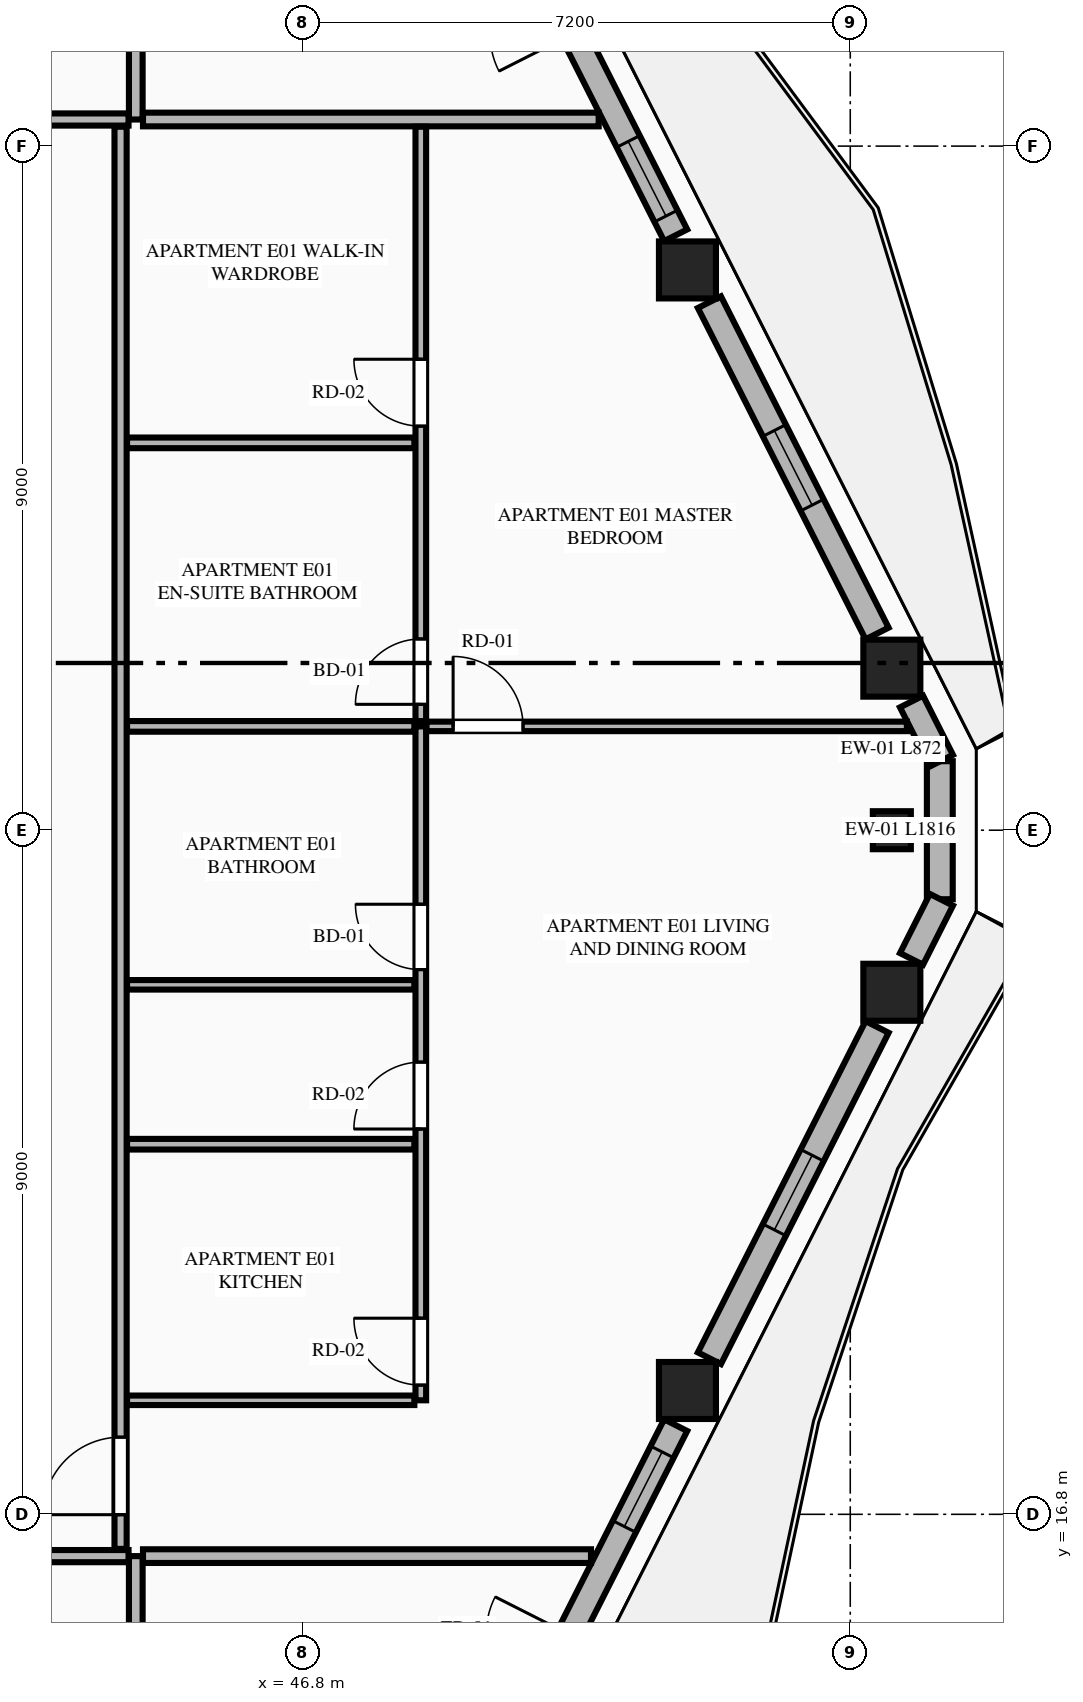
"""IFC4 building model, lengths in metres.
Left out: names, types, materials, properties, quantities, classifications, styles, units other than length and angle.
Written with IfcOpenShell. Run it as: python <this file> out.ifc"""

import sys

from ifc_helpers import new_model, si_unit, direction, frame, frame_2d, origin, origin_2d, place, context, subcontext, project, spatial, rectangle, extrude, element, fill, save


model = new_model("IFC4")
c1 = context("Model", 3, precision=1e-05, world=origin(), true_north=direction((0.0, 1.0)))
c2 = subcontext(c1, "Body", "Model", "MODEL_VIEW")
j1 = project(units=[si_unit("LENGTHUNIT", "METRE"), si_unit("PLANEANGLEUNIT", "RADIAN")], contexts=[c1])
p1 = place(None, origin())
s1 = spatial("IfcSite", under=j1, at=p1, CompositionType="ELEMENT")
p2 = place(p1, origin())
s2 = spatial("IfcBuilding", under=s1, at=p2, CompositionType="ELEMENT")
p3 = place(p2, frame((0.0, 0.0, 210.95)))
s3 = spatial("IfcBuildingStorey", under=s2, at=p3, CompositionType="ELEMENT", Elevation=210.95)
for number, where, z_axis, x_axis in (
    (1, (51.858, 18.429, 0.0), (0.0, 0.0, 1.0), (1.0, 0.0, 0.0)),
    (2, (54.547, 23.668, 0.0), (0.0, 0.0, 1.0), (1.0, 0.0, 0.0)),
    (3, (54.547, 27.932, 0.0), (0.0, 0.0, 1.0), (1.0, 0.0, 0.0)),
    (4, (51.858, 33.171, 0.0), (0.0, 0.0, 1.0), (1.0, 0.0, 0.0)),
):
    element("IfcColumn", number, at=place(p3, frame(where, z_axis=z_axis, x_axis=x_axis)), inside=s3, PredefinedType="COLUMN", context=c2, shape_type="SweptSolid", body=[
        extrude(rectangle(XDim=0.75, YDim=0.75, at=origin_2d()), origin(), (0.0, 0.0, 1.0), 3.55),
    ])
p4 = place(p3, frame((54.547, 25.8, 0.0), z_axis=(0.0, 0.0, 1.0), x_axis=(0.0, 1.0, 0.0)))
e5 = element("IfcColumn", 5, at=p4, inside=s3, PredefinedType="PILASTER", context=c2, shape_type="SweptSolid", body=[
    extrude(rectangle(XDim=0.5, YDim=0.35, at=origin_2d()), origin(), (0.0, 0.0, 1.0), 3.55),
])
p5 = place(p3, frame((55.178, 24.892, 0.0), z_axis=(0.0, 0.0, 1.0), x_axis=(0.0, 1.0, 0.0)))
e6 = element("IfcWall", 6, at=p5, inside=s3, PredefinedType="STANDARD", context=c2, shape_type="SweptSolid", body=[
    extrude(rectangle(XDim=1.816, YDim=0.34, at=frame_2d((0.908, 0.0))), origin(), (0.0, 0.0, 1.0), 3.35),
])
p6 = place(p3, frame((49.403, 13.427, 0.0), z_axis=(0.0, 0.0, 1.0), x_axis=(0.451425765525, 0.892308678777, 0.0)))
e7 = element("IfcWall", 7, at=p6, inside=s3, PredefinedType="STANDARD", context=c2, shape_type="SweptSolid", body=[
    extrude(rectangle(XDim=5.094, YDim=0.34, at=frame_2d((2.547, 0.0))), origin(), (0.0, 0.0, 1.0), 2.883),
])
p7 = place(p6, frame((0.907, 0.0, 0.0)))
e8 = element("IfcOpeningElement", 8, at=p7, cuts=e7, PredefinedType="OPENING", context=c2, shape_type="SweptSolid", body=[
    extrude(rectangle(XDim=1.1, YDim=2.25, at=frame_2d((0.55, 1.125))), frame((0.0, 0.18, 0.0), z_axis=(0.0, -1.0, 0.0), x_axis=(1.0, 0.0, 0.0)), (0.0, 0.0, 1.0), 0.36),
])
p8 = place(p6, frame((3.6, 0.0, 0.75)))
e9 = element("IfcOpeningElement", 9, at=p8, cuts=e7, PredefinedType="OPENING", context=c2, shape_type="SweptSolid", body=[
    extrude(rectangle(XDim=1.1, YDim=1.983, at=frame_2d((0.55, 0.991))), frame((0.0, 0.18, 0.0), z_axis=(0.0, -1.0, 0.0), x_axis=(1.0, 0.0, 0.0)), (0.0, 0.0, 1.0), 0.36),
])
p9 = place(p3, frame((52.147, 18.853, 0.0), z_axis=(0.0, 0.0, 1.0), x_axis=(0.451566029745, 0.892237704191, 0.0)))
e10 = element("IfcWall", 10, at=p9, inside=s3, PredefinedType="STANDARD", context=c2, shape_type="SweptSolid", body=[
    extrude(rectangle(XDim=4.885, YDim=0.34, at=frame_2d((2.443, 0.0))), origin(), (0.0, 0.0, 1.0), 2.883),
])
p10 = place(p9, frame((1.893, 0.0, 0.75)))
e11 = element("IfcOpeningElement", 11, at=p10, cuts=e10, PredefinedType="OPENING", context=c2, shape_type="SweptSolid", body=[
    extrude(rectangle(XDim=1.1, YDim=1.983, at=frame_2d((0.55, 0.991))), frame((0.0, 0.18, 0.0), z_axis=(0.0, -1.0, 0.0), x_axis=(1.0, 0.0, 0.0)), (0.0, 0.0, 1.0), 0.36),
])
p11 = place(p3, frame((54.806, 24.107, 0.0), z_axis=(0.0, 0.0, 1.0), x_axis=(0.450906649871, 0.892571113751, 0.0)))
e12 = element("IfcWall", 12, at=p11, inside=s3, PredefinedType="STANDARD", context=c2, shape_type="SweptSolid", body=[
    extrude(rectangle(XDim=0.872, YDim=0.34, at=frame_2d((0.436, 0.0))), origin(), (0.0, 0.0, 1.0), 3.35),
])
p12 = place(p3, frame((55.199, 26.715, 0.0), z_axis=(0.0, 0.0, 1.0), x_axis=(-0.451019391667, 0.892514150218, 0.0)))
e13 = element("IfcWall", 13, at=p12, inside=s3, PredefinedType="STANDARD", context=c2, shape_type="SweptSolid", body=[
    extrude(rectangle(XDim=0.872, YDim=0.34, at=frame_2d((0.436, 0.0))), origin(), (0.0, 0.0, 1.0), 3.35),
])
p13 = place(p3, frame((54.353, 28.388, 0.0), z_axis=(0.0, 0.0, 1.0), x_axis=(-0.451545895749, 0.892247893824, 0.0)))
e14 = element("IfcWall", 14, at=p13, inside=s3, PredefinedType="STANDARD", context=c2, shape_type="SweptSolid", body=[
    extrude(rectangle(XDim=4.885, YDim=0.34, at=frame_2d((2.443, 0.0))), origin(), (0.0, 0.0, 1.0), 2.883),
])
p14 = place(p13, frame((1.893, 0.0, 0.75)))
e15 = element("IfcOpeningElement", 15, at=p14, cuts=e14, PredefinedType="OPENING", context=c2, shape_type="SweptSolid", body=[
    extrude(rectangle(XDim=1.1, YDim=1.983, at=frame_2d((0.55, 0.991))), frame((0.0, 0.18, 0.0), z_axis=(0.0, -1.0, 0.0), x_axis=(1.0, 0.0, 0.0)), (0.0, 0.0, 1.0), 0.36),
])
p15 = place(p3, frame((51.703, 33.627, 0.0), z_axis=(0.0, 0.0, 1.0), x_axis=(-0.451406462707, 0.892318443957, 0.0)))
e16 = element("IfcWall", 16, at=p15, inside=s3, PredefinedType="STANDARD", context=c2, shape_type="SweptSolid", body=[
    extrude(rectangle(XDim=5.095, YDim=0.34, at=frame_2d((2.547, 0.0))), origin(), (0.0, 0.0, 1.0), 2.883),
])
p16 = place(p15, frame((2.976, 0.0, 0.0)))
e17 = element("IfcOpeningElement", 17, at=p16, cuts=e16, PredefinedType="OPENING", context=c2, shape_type="SweptSolid", body=[
    extrude(rectangle(XDim=1.1, YDim=2.25, at=frame_2d((0.55, 1.125))), frame((0.0, 0.18, 0.0), z_axis=(0.0, -1.0, 0.0), x_axis=(1.0, 0.0, 0.0)), (0.0, 0.0, 1.0), 0.36),
])
p17 = place(p15, frame((0.283, 0.0, 0.75)))
e18 = element("IfcOpeningElement", 18, at=p17, cuts=e16, PredefinedType="OPENING", context=c2, shape_type="SweptSolid", body=[
    extrude(rectangle(XDim=1.1, YDim=1.983, at=frame_2d((0.55, 0.991))), frame((0.0, 0.18, 0.0), z_axis=(0.0, -1.0, 0.0), x_axis=(1.0, 0.0, 0.0)), (0.0, 0.0, 1.0), 0.36),
])
p18 = place(p3, frame((44.6, 5.968, 0.0), z_axis=(0.0, 0.0, 1.0), x_axis=(0.0, 1.0, 0.0)))
e19 = element("IfcWall", 19, at=p18, inside=s3, PredefinedType="PARTITIONING", context=c2, shape_type="SweptSolid", body=[
    extrude(rectangle(XDim=10.282, YDim=0.18, at=frame_2d((5.141, 0.0))), origin(), (0.0, 0.0, 1.0), 3.35),
])
p19 = place(p3, frame((20.295, 16.25, 0.0), z_axis=(0.0, 0.0, 1.0), x_axis=(1.0, 0.0, 0.0)))
e20 = element("IfcWall", 20, at=p19, inside=s3, PredefinedType="PARTITIONING", context=c2, shape_type="SweptSolid", body=[
    extrude(rectangle(XDim=24.21, YDim=0.16, at=frame_2d((12.105, 0.0))), origin(), (0.0, 0.0, 1.0), 3.35),
])
p20 = place(p19, frame((22.005, 0.0, 0.0)))
e21 = element("IfcOpeningElement", 21, at=p20, cuts=e20, PredefinedType="OPENING", context=c2, shape_type="SweptSolid", body=[
    extrude(rectangle(XDim=1.02, YDim=2.25, at=frame_2d((0.51, 1.125))), frame((0.0, 0.09, 0.0), z_axis=(0.0, -1.0, 0.0), x_axis=(1.0, 0.0, 0.0)), (0.0, 0.0, 1.0), 0.18),
])
p21 = place(p3, frame((44.6, 35.15, 0.0), z_axis=(0.0, 0.0, 1.0), x_axis=(0.0, 1.0, 0.0)))
e22 = element("IfcWall", 22, at=p21, inside=s3, PredefinedType="PARTITIONING", context=c2, shape_type="SweptSolid", body=[
    extrude(rectangle(XDim=10.482, YDim=0.18, at=frame_2d((5.241, 0.0))), origin(), (0.0, 0.0, 1.0), 3.35),
])
p22 = place(p3, frame((20.295, 35.15, 0.0), z_axis=(0.0, 0.0, 1.0), x_axis=(1.0, 0.0, 0.0)))
e23 = element("IfcWall", 23, at=p22, inside=s3, PredefinedType="PARTITIONING", context=c2, shape_type="SweptSolid", body=[
    extrude(rectangle(XDim=24.21, YDim=0.16, at=frame_2d((12.105, 0.0))), origin(), (0.0, 0.0, 1.0), 3.35),
])
p23 = place(p22, frame((0.405, 0.0, 0.0)))
e24 = element("IfcOpeningElement", 24, at=p23, cuts=e23, PredefinedType="OPENING", context=c2, shape_type="SweptSolid", body=[
    extrude(rectangle(XDim=1.35, YDim=2.35, at=frame_2d((0.675, 1.175))), frame((0.0, 0.09, 0.0), z_axis=(0.0, -1.0, 0.0), x_axis=(1.0, 0.0, 0.0)), (0.0, 0.0, 1.0), 0.18),
])
p24 = place(p3, frame((44.695, 16.25, 0.0), z_axis=(0.0, 0.0, 1.0), x_axis=(1.0, 0.0, 0.0)))
e25 = element("IfcWall", 25, at=p24, inside=s3, PredefinedType="PARTITIONING", context=c2, shape_type="SweptSolid", body=[
    extrude(rectangle(XDim=5.894, YDim=0.18, at=frame_2d((2.947, 0.0))), origin(), (0.0, 0.0, 1.0), 3.35),
])
p25 = place(p3, frame((44.695, 35.15, 0.0), z_axis=(0.0, 0.0, 1.0), x_axis=(1.0, 0.0, 0.0)))
e26 = element("IfcWall", 26, at=p25, inside=s3, PredefinedType="PARTITIONING", context=c2, shape_type="SweptSolid", body=[
    extrude(rectangle(XDim=5.995, YDim=0.18, at=frame_2d((2.998, 0.0))), origin(), (0.0, 0.0, 1.0), 3.35),
])
p26 = place(p3, frame((44.4, 16.345, 0.0), z_axis=(0.0, 0.0, 1.0), x_axis=(0.0, 1.0, 0.0)))
e27 = element("IfcWall", 27, at=p26, inside=s3, PredefinedType="PARTITIONING", context=c2, shape_type="SweptSolid", body=[
    extrude(rectangle(XDim=18.71, YDim=0.16, at=frame_2d((9.355, 0.0))), origin(), (0.0, 0.0, 1.0), 3.35),
])
p27 = place(p26, frame((0.45, 0.0, 0.0)))
e28 = element("IfcOpeningElement", 28, at=p27, cuts=e27, PredefinedType="OPENING", context=c2, shape_type="SweptSolid", body=[
    extrude(rectangle(XDim=1.02, YDim=2.25, at=frame_2d((0.51, 1.125))), frame((0.0, 0.09, 0.0), z_axis=(0.0, -1.0, 0.0), x_axis=(1.0, 0.0, 0.0)), (0.0, 0.0, 1.0), 0.18),
])
p28 = place(p3, frame((44.485, 18.3, 0.0), z_axis=(0.0, 0.0, 1.0), x_axis=(1.0, 0.0, 0.0)))
e29 = element("IfcWall", 29, at=p28, inside=s3, PredefinedType="PARTITIONING", context=c2, shape_type="SweptSolid", body=[
    extrude(rectangle(XDim=3.78, YDim=0.125, at=frame_2d((1.89, 0.0))), origin(), (0.0, 0.0, 1.0), 2.807),
])
p29 = place(p3, frame((48.35, 18.3, 0.0), z_axis=(0.0, 0.0, 1.0), x_axis=(0.0, 1.0, 0.0)))
e30 = element("IfcWall", 30, at=p29, inside=s3, PredefinedType="PLUMBINGWALL", context=c2, shape_type="SweptSolid", body=[
    extrude(rectangle(XDim=8.866, YDim=0.14, at=frame_2d((4.433, 0.0))), origin(), (0.0, 0.0, 1.0), 3.35),
])
p30 = place(p29, frame((0.2, 0.0, 0.0)))
e31 = element("IfcOpeningElement", 31, at=p30, cuts=e30, PredefinedType="OPENING", context=c2, shape_type="SweptSolid", body=[
    extrude(rectangle(XDim=0.88, YDim=2.15, at=frame_2d((0.44, 1.075))), frame((0.0, 0.08, 0.0), z_axis=(0.0, -1.0, 0.0), x_axis=(1.0, 0.0, 0.0)), (0.0, 0.0, 1.0), 0.16),
])
p31 = place(p29, frame((3.569, 0.0, 0.0)))
e32 = element("IfcOpeningElement", 32, at=p31, cuts=e30, PredefinedType="OPENING", context=c2, shape_type="SweptSolid", body=[
    extrude(rectangle(XDim=0.88, YDim=2.15, at=frame_2d((0.44, 1.075))), frame((0.0, 0.08, 0.0), z_axis=(0.0, -1.0, 0.0), x_axis=(1.0, 0.0, 0.0)), (0.0, 0.0, 1.0), 0.16),
])
p32 = place(p29, frame((5.666, 0.0, 0.0)))
e33 = element("IfcOpeningElement", 33, at=p32, cuts=e30, PredefinedType="OPENING", context=c2, shape_type="SweptSolid", body=[
    extrude(rectangle(XDim=0.86, YDim=2.1, at=frame_2d((0.43, 1.05))), frame((0.0, 0.08, 0.0), z_axis=(0.0, -1.0, 0.0), x_axis=(1.0, 0.0, 0.0)), (0.0, 0.0, 1.0), 0.16),
])
p33 = place(p3, frame((48.35, 27.236, 0.0), z_axis=(0.0, 0.0, 1.0), x_axis=(0.0, 1.0, 0.0)))
e34 = element("IfcWall", 34, at=p33, inside=s3, PredefinedType="PLUMBINGWALL", context=c2, shape_type="SweptSolid", body=[
    extrude(rectangle(XDim=7.819, YDim=0.14, at=frame_2d((3.909, 0.0))), origin(), (0.0, 0.0, 1.0), 3.35),
])
p34 = place(p33, frame((0.22, 0.0, 0.0)))
e35 = element("IfcOpeningElement", 35, at=p34, cuts=e34, PredefinedType="OPENING", context=c2, shape_type="SweptSolid", body=[
    extrude(rectangle(XDim=0.86, YDim=2.1, at=frame_2d((0.43, 1.05))), frame((0.0, 0.08, 0.0), z_axis=(0.0, -1.0, 0.0), x_axis=(1.0, 0.0, 0.0)), (0.0, 0.0, 1.0), 0.16),
])
p35 = place(p33, frame((3.88, 0.0, 0.0)))
e36 = element("IfcOpeningElement", 36, at=p35, cuts=e34, PredefinedType="OPENING", context=c2, shape_type="SweptSolid", body=[
    extrude(rectangle(XDim=0.88, YDim=2.15, at=frame_2d((0.44, 1.075))), frame((0.0, 0.08, 0.0), z_axis=(0.0, -1.0, 0.0), x_axis=(1.0, 0.0, 0.0)), (0.0, 0.0, 1.0), 0.16),
])
p36 = place(p3, frame((44.485, 27.166, 0.0), z_axis=(0.0, 0.0, 1.0), x_axis=(1.0, 0.0, 0.0)))
e37 = element("IfcWall", 37, at=p36, inside=s3, PredefinedType="PLUMBINGWALL", context=c2, shape_type="SweptSolid", body=[
    extrude(rectangle(XDim=3.78, YDim=0.14, at=frame_2d((1.89, 0.0))), origin(), (0.0, 0.0, 1.0), 3.35),
])
p37 = place(p3, frame((48.425, 27.166, 0.0), z_axis=(0.0, 0.0, 1.0), x_axis=(1.0, 0.0, 0.0)))
e38 = element("IfcWall", 38, at=p37, inside=s3, PredefinedType="PARTITIONING", context=c2, shape_type="SweptSolid", body=[
    extrude(rectangle(XDim=6.32, YDim=0.125, at=frame_2d((3.16, 0.0))), origin(), (0.0, 0.0, 1.0), 3.35),
])
p38 = place(p37, frame((0.35, 0.0, 0.0)))
e39 = element("IfcOpeningElement", 39, at=p38, cuts=e38, PredefinedType="OPENING", context=c2, shape_type="SweptSolid", body=[
    extrude(rectangle(XDim=0.92, YDim=2.15, at=frame_2d((0.46, 1.075))), frame((0.0, 0.073, 0.0), z_axis=(0.0, -1.0, 0.0), x_axis=(1.0, 0.0, 0.0)), (0.0, 0.0, 1.0), 0.145),
])
p39 = place(p3, frame((44.485, 21.669, 0.0), z_axis=(0.0, 0.0, 1.0), x_axis=(1.0, 0.0, 0.0)))
e40 = element("IfcWall", 40, at=p39, inside=s3, PredefinedType="PLUMBINGWALL", context=c2, shape_type="SweptSolid", body=[
    extrude(rectangle(XDim=3.78, YDim=0.14, at=frame_2d((1.89, 0.0))), origin(), (0.0, 0.0, 1.0), 3.35),
])
p40 = place(p3, frame((44.485, 23.766, 0.0), z_axis=(0.0, 0.0, 1.0), x_axis=(1.0, 0.0, 0.0)))
e41 = element("IfcWall", 41, at=p40, inside=s3, PredefinedType="PARTITIONING", context=c2, shape_type="SweptSolid", body=[
    extrude(rectangle(XDim=3.78, YDim=0.125, at=frame_2d((1.89, 0.0))), origin(), (0.0, 0.0, 1.0), 2.807),
])
p41 = place(p3, frame((44.485, 30.896, 0.0), z_axis=(0.0, 0.0, 1.0), x_axis=(1.0, 0.0, 0.0)))
e42 = element("IfcWall", 42, at=p41, inside=s3, PredefinedType="PLUMBINGWALL", context=c2, shape_type="SweptSolid", body=[
    extrude(rectangle(XDim=3.78, YDim=0.14, at=frame_2d((1.89, 0.0))), origin(), (0.0, 0.0, 1.0), 3.35),
])
p42 = place(p10, origin())
e43 = element("IfcWindow", 43, at=p42, inside=s3, PartitioningType="SINGLE_PANEL", PredefinedType="WINDOW", context=c2, shape_type="SweptSolid", body=[
    extrude(rectangle(XDim=1.1, YDim=1.983, at=frame_2d((0.55, 0.991))), frame((0.0, 0.03, 0.0), z_axis=(0.0, -1.0, 0.0), x_axis=(1.0, 0.0, 0.0)), (0.0, 0.0, 1.0), 0.06),
])
fill(e11, e43)
p43 = place(p14, origin())
e44 = element("IfcWindow", 44, at=p43, inside=s3, PartitioningType="SINGLE_PANEL", PredefinedType="WINDOW", context=c2, shape_type="SweptSolid", body=[
    extrude(rectangle(XDim=1.1, YDim=1.983, at=frame_2d((0.55, 0.991))), frame((0.0, 0.03, 0.0), z_axis=(0.0, -1.0, 0.0), x_axis=(1.0, 0.0, 0.0)), (0.0, 0.0, 1.0), 0.06),
])
fill(e15, e44)
p44 = place(p30, origin())
e45 = element("IfcDoor", 45, at=p44, inside=s3, OperationType="SINGLE_SWING_RIGHT", PredefinedType="DOOR", context=c2, shape_type="SweptSolid", body=[
    extrude(rectangle(XDim=0.88, YDim=2.15, at=frame_2d((0.44, 1.075))), frame((0.0, 0.025, 0.0), z_axis=(0.0, -1.0, 0.0), x_axis=(1.0, 0.0, 0.0)), (0.0, 0.0, 1.0), 0.05),
])
fill(e31, e45)
p45 = place(p31, origin())
e46 = element("IfcDoor", 46, at=p45, inside=s3, OperationType="SINGLE_SWING_LEFT", PredefinedType="DOOR", context=c2, shape_type="SweptSolid", body=[
    extrude(rectangle(XDim=0.88, YDim=2.15, at=frame_2d((0.44, 1.075))), frame((0.0, 0.025, 0.0), z_axis=(0.0, -1.0, 0.0), x_axis=(1.0, 0.0, 0.0)), (0.0, 0.0, 1.0), 0.05),
])
fill(e32, e46)
p46 = place(p32, origin())
e47 = element("IfcDoor", 47, at=p46, inside=s3, OperationType="SINGLE_SWING_RIGHT", PredefinedType="DOOR", context=c2, shape_type="SweptSolid", body=[
    extrude(rectangle(XDim=0.86, YDim=2.1, at=frame_2d((0.43, 1.05))), frame((0.0, 0.025, 0.0), z_axis=(0.0, -1.0, 0.0), x_axis=(1.0, 0.0, 0.0)), (0.0, 0.0, 1.0), 0.05),
])
fill(e33, e47)
p47 = place(p34, origin())
e48 = element("IfcDoor", 48, at=p47, inside=s3, OperationType="SINGLE_SWING_LEFT", PredefinedType="DOOR", context=c2, shape_type="SweptSolid", body=[
    extrude(rectangle(XDim=0.86, YDim=2.1, at=frame_2d((0.43, 1.05))), frame((0.0, 0.025, 0.0), z_axis=(0.0, -1.0, 0.0), x_axis=(1.0, 0.0, 0.0)), (0.0, 0.0, 1.0), 0.05),
])
fill(e35, e48)
p48 = place(p35, origin())
e49 = element("IfcDoor", 49, at=p48, inside=s3, OperationType="SINGLE_SWING_RIGHT", PredefinedType="DOOR", context=c2, shape_type="SweptSolid", body=[
    extrude(rectangle(XDim=0.88, YDim=2.15, at=frame_2d((0.44, 1.075))), frame((0.0, 0.025, 0.0), z_axis=(0.0, -1.0, 0.0), x_axis=(1.0, 0.0, 0.0)), (0.0, 0.0, 1.0), 0.05),
])
fill(e36, e49)
p49 = place(p27, origin())
e50 = element("IfcDoor", 50, at=p49, inside=s3, OperationType="SINGLE_SWING_LEFT", PredefinedType="DOOR", context=c2, shape_type="SweptSolid", body=[
    extrude(rectangle(XDim=1.02, YDim=2.25, at=frame_2d((0.51, 1.125))), frame((0.0, 0.025, 0.0), z_axis=(0.0, -1.0, 0.0), x_axis=(1.0, 0.0, 0.0)), (0.0, 0.0, 1.0), 0.05),
])
fill(e28, e50)
p50 = place(p38, origin())
e51 = element("IfcDoor", 51, at=p50, inside=s3, OperationType="SINGLE_SWING_LEFT", PredefinedType="DOOR", context=c2, shape_type="SweptSolid", body=[
    extrude(rectangle(XDim=0.92, YDim=2.15, at=frame_2d((0.46, 1.075))), frame((0.0, 0.025, 0.0), z_axis=(0.0, -1.0, 0.0), x_axis=(1.0, 0.0, 0.0)), (0.0, 0.0, 1.0), 0.05),
])
fill(e39, e51)
p51 = place(p8, origin())
e52 = element("IfcWindow", 52, at=p51, inside=s3, PartitioningType="SINGLE_PANEL", PredefinedType="WINDOW", context=c2, shape_type="SweptSolid", body=[
    extrude(rectangle(XDim=1.1, YDim=1.983, at=frame_2d((0.55, 0.991))), frame((0.0, 0.03, 0.0), z_axis=(0.0, -1.0, 0.0), x_axis=(1.0, 0.0, 0.0)), (0.0, 0.0, 1.0), 0.06),
])
fill(e9, e52)
p52 = place(p17, origin())
e53 = element("IfcWindow", 53, at=p52, inside=s3, PartitioningType="SINGLE_PANEL", PredefinedType="WINDOW", context=c2, shape_type="SweptSolid", body=[
    extrude(rectangle(XDim=1.1, YDim=1.983, at=frame_2d((0.55, 0.991))), frame((0.0, 0.03, 0.0), z_axis=(0.0, -1.0, 0.0), x_axis=(1.0, 0.0, 0.0)), (0.0, 0.0, 1.0), 0.06),
])
fill(e18, e53)
save(model, sys.argv[1])
